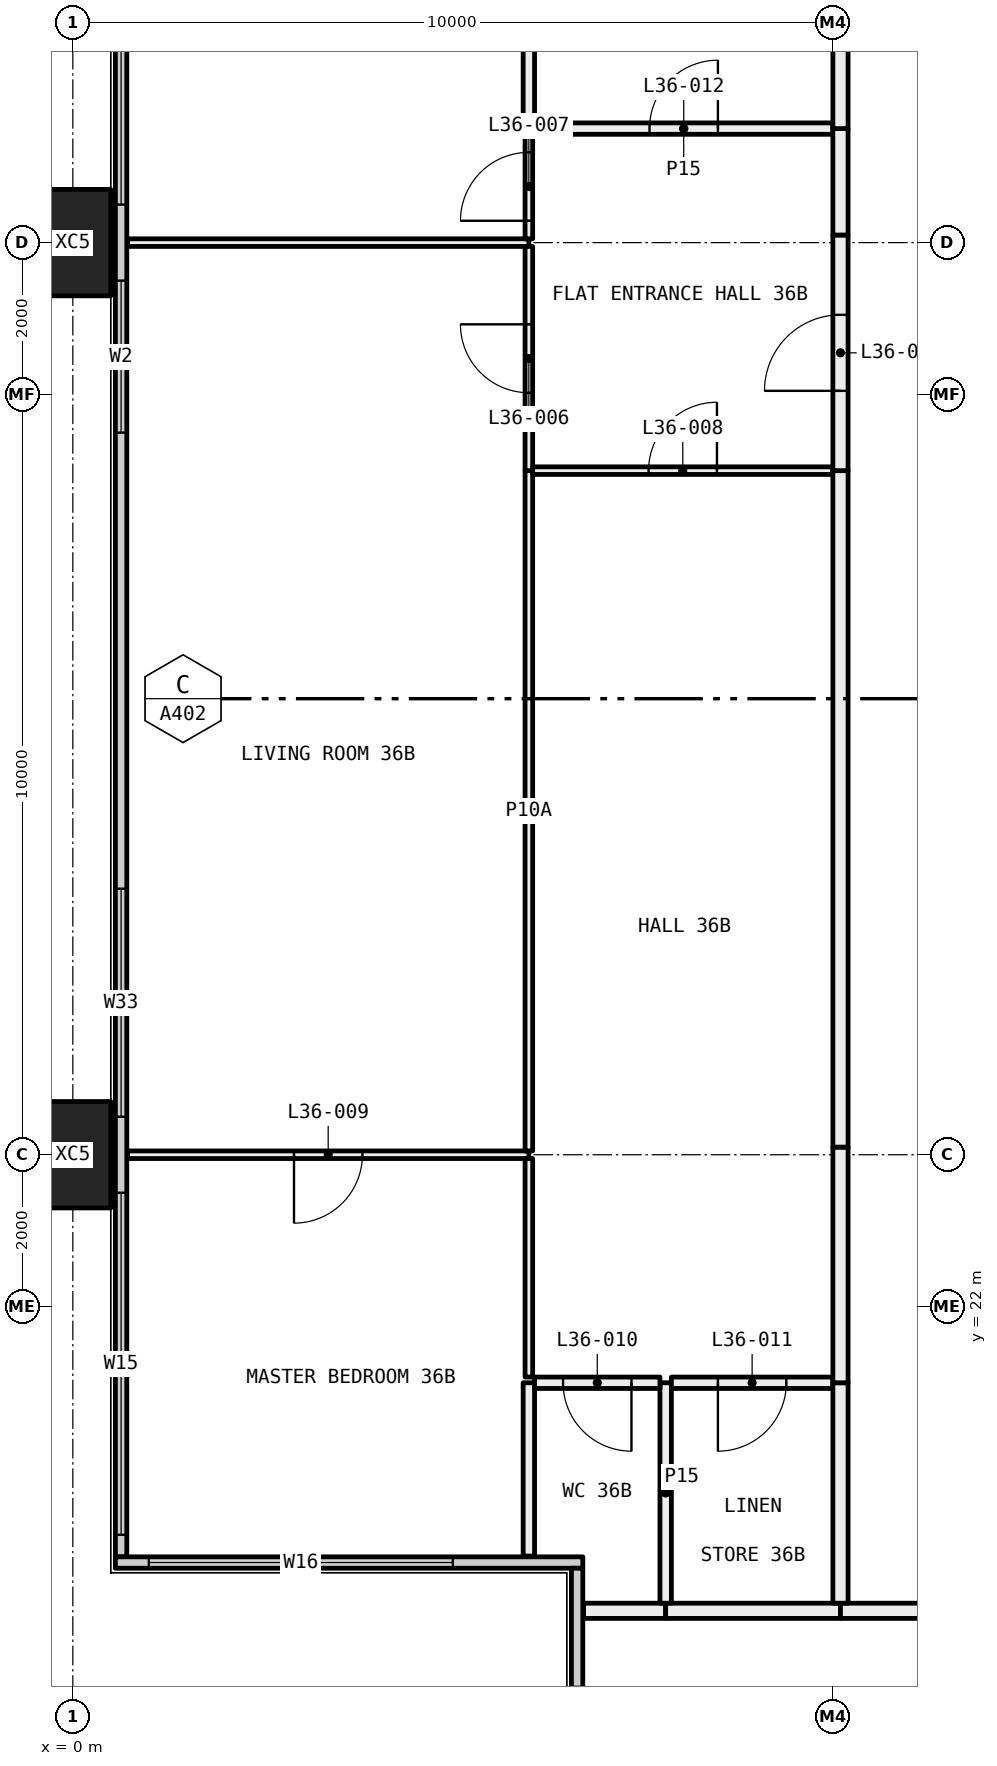
"""IFC4 building model, lengths in metres.
Left out: names, types, materials, properties, quantities, classifications, styles, units other than length and angle.
Written with IfcOpenShell. Run it as: python <this file> out.ifc"""

import sys

from ifc_helpers import new_model, si_unit, direction, frame, frame_2d, origin, origin_2d, place, context, subcontext, project, spatial, rectangle, hollow_rectangle, extrude, element, fill, save


model = new_model("IFC4")
c1 = context("Model", 3, precision=1e-05, world=origin(), true_north=direction((0.0, 1.0)))
c2 = subcontext(c1, "Body", "Model", "MODEL_VIEW")
j1 = project(units=[si_unit("LENGTHUNIT", "METRE"), si_unit("PLANEANGLEUNIT", "RADIAN")], contexts=[c1])
p1 = place(None, origin())
s1 = spatial("IfcSite", under=j1, at=p1, CompositionType="ELEMENT")
p2 = place(p1, origin())
s2 = spatial("IfcBuilding", under=s1, at=p2, CompositionType="ELEMENT")
p3 = place(p2, frame((0.0, 0.0, 138.0)))
s3 = spatial("IfcBuildingStorey", under=s2, at=p3, CompositionType="ELEMENT", Elevation=138.0)
for number, where, z_axis, x_axis in (
    (1, (0.0, 24.0, -0.4), (0.0, 0.0, 1.0), (0.0, 1.0, 0.0)),
    (2, (0.0, 36.0, -0.4), (0.0, 0.0, 1.0), (0.0, 1.0, 0.0)),
):
    element("IfcColumn", number, at=place(p3, frame(where, z_axis=z_axis, x_axis=x_axis)), inside=s3, PredefinedType="COLUMN", context=c2, shape_type="SweptSolid", body=[
        extrude(hollow_rectangle(XDim=1.4, YDim=1.0, WallThickness=0.055, at=origin_2d()), origin(), (0.0, 0.0, 1.0), 3.45),
    ])
p4 = place(p3, frame((0.635, 18.71, 0.0), z_axis=(0.0, 0.0, 1.0), x_axis=(0.0, 1.0, 0.0)))
e3 = element("IfcWall", 3, at=p4, inside=s3, PredefinedType="ELEMENTEDWALL", context=c2, shape_type="SweptSolid", body=[
    extrude(rectangle(XDim=22.58, YDim=0.15, at=frame_2d((11.29, 0.0))), origin(), (0.0, 0.0, 1.0), 3.05),
])
p5 = place(p4, frame((0.29, 0.0, 0.45)))
e4 = element("IfcOpeningElement", 4, at=p5, cuts=e3, PredefinedType="OPENING", context=c2, shape_type="SweptSolid", body=[
    extrude(rectangle(XDim=4.5, YDim=2.55, at=frame_2d((2.25, 1.275))), frame((0.0, 0.085, 0.0), z_axis=(0.0, -1.0, 0.0), x_axis=(1.0, 0.0, 0.0)), (0.0, 0.0, 1.0), 0.17),
])
p6 = place(p4, frame((5.79, 0.0, 0.45)))
e5 = element("IfcOpeningElement", 5, at=p6, cuts=e3, PredefinedType="OPENING", context=c2, shape_type="SweptSolid", body=[
    extrude(rectangle(XDim=3.0, YDim=2.55, at=frame_2d((1.5, 1.275))), frame((0.0, 0.085, 0.0), z_axis=(0.0, -1.0, 0.0), x_axis=(1.0, 0.0, 0.0)), (0.0, 0.0, 1.0), 0.17),
])
p7 = place(p4, frame((14.79, 0.0, 0.45)))
e6 = element("IfcOpeningElement", 6, at=p7, cuts=e3, PredefinedType="OPENING", context=c2, shape_type="SweptSolid", body=[
    extrude(rectangle(XDim=2.0, YDim=2.55, at=frame_2d((1.0, 1.275))), frame((0.0, 0.085, 0.0), z_axis=(0.0, -1.0, 0.0), x_axis=(1.0, 0.0, 0.0)), (0.0, 0.0, 1.0), 0.17),
])
p8 = place(p4, frame((17.79, 0.0, 0.45)))
e7 = element("IfcOpeningElement", 7, at=p8, cuts=e3, PredefinedType="OPENING", context=c2, shape_type="SweptSolid", body=[
    extrude(rectangle(XDim=4.5, YDim=2.55, at=frame_2d((2.25, 1.275))), frame((0.0, 0.085, 0.0), z_axis=(0.0, -1.0, 0.0), x_axis=(1.0, 0.0, 0.0)), (0.0, 0.0, 1.0), 0.17),
])
p9 = place(p3, frame((0.56, 18.635, 0.0), z_axis=(0.0, 0.0, 1.0), x_axis=(1.0, 0.0, 0.0)))
e8 = element("IfcWall", 8, at=p9, inside=s3, PredefinedType="ELEMENTEDWALL", context=c2, shape_type="SweptSolid", body=[
    extrude(rectangle(XDim=6.15, YDim=0.15, at=frame_2d((3.075, 0.0))), origin(), (0.0, 0.0, 1.0), 3.05),
])
p10 = place(p9, frame((0.44, 0.0, 0.45)))
e9 = element("IfcOpeningElement", 9, at=p10, cuts=e8, PredefinedType="OPENING", context=c2, shape_type="SweptSolid", body=[
    extrude(rectangle(XDim=4.0, YDim=2.55, at=frame_2d((2.0, 1.275))), frame((0.0, 0.085, 0.0), z_axis=(0.0, -1.0, 0.0), x_axis=(1.0, 0.0, 0.0)), (0.0, 0.0, 1.0), 0.17),
])
p11 = place(p3, frame((6.635, 12.71, 0.0), z_axis=(0.0, 0.0, 1.0), x_axis=(0.0, 1.0, 0.0)))
e10 = element("IfcWall", 10, at=p11, inside=s3, PredefinedType="ELEMENTEDWALL", context=c2, shape_type="SweptSolid", body=[
    extrude(rectangle(XDim=5.85, YDim=0.15, at=frame_2d((2.925, 0.0))), origin(), (0.0, 0.0, 1.0), 3.05),
])
p12 = place(p11, frame((0.29, 0.0, 0.45)))
e11 = element("IfcOpeningElement", 11, at=p12, cuts=e10, PredefinedType="OPENING", context=c2, shape_type="SweptSolid", body=[
    extrude(rectangle(XDim=4.0, YDim=2.55, at=frame_2d((2.0, 1.275))), frame((0.0, 0.085, 0.0), z_axis=(0.0, -1.0, 0.0), x_axis=(1.0, 0.0, 0.0)), (0.0, 0.0, 1.0), 0.17),
])
p13 = place(p3, frame((7.8, 18.0, 0.0), z_axis=(0.0, 0.0, 1.0), x_axis=(-1.0, 0.0, 0.0)))
e12 = element("IfcWall", 12, at=p13, inside=s3, PredefinedType="PARTITIONING", context=c2, shape_type="SweptSolid", body=[
    extrude(rectangle(XDim=1.08, YDim=0.2, at=frame_2d((0.54, 0.0))), origin(), (0.0, 0.0, 1.0), 3.05),
])
p14 = place(p3, frame((10.1, 18.0, 0.0), z_axis=(0.0, 0.0, 1.0), x_axis=(-1.0, 0.0, 0.0)))
e13 = element("IfcWall", 13, at=p14, inside=s3, PredefinedType="PARTITIONING", context=c2, shape_type="SweptSolid", body=[
    extrude(rectangle(XDim=2.3, YDim=0.2, at=frame_2d((1.15, 0.0))), origin(), (0.0, 0.0, 1.0), 3.05),
])
p15 = place(p3, frame((12.0, 18.0, 0.0), z_axis=(0.0, 0.0, 1.0), x_axis=(-1.0, 0.0, 0.0)))
e14 = element("IfcWall", 14, at=p15, inside=s3, PredefinedType="PARTITIONING", context=c2, shape_type="SweptSolid", body=[
    extrude(rectangle(XDim=1.9, YDim=0.2, at=frame_2d((0.95, 0.0))), origin(), (0.0, 0.0, 1.0), 3.05),
])
p16 = place(p3, frame((6.0, 24.0, 0.0), z_axis=(0.0, 0.0, 1.0), x_axis=(-1.0, 0.0, 0.0)))
e15 = element("IfcWall", 15, at=p16, inside=s3, PredefinedType="PARTITIONING", context=c2, shape_type="SweptSolid", body=[
    extrude(rectangle(XDim=5.28, YDim=0.1, at=frame_2d((2.64, 0.0))), origin(), (0.0, 0.0, 1.0), 2.45),
])
p17 = place(p16, frame((2.19, 0.0, 0.0)))
e16 = element("IfcOpeningElement", 16, at=p17, cuts=e15, PredefinedType="OPENING", context=c2, shape_type="SweptSolid", body=[
    extrude(rectangle(XDim=0.9, YDim=2.1, at=frame_2d((0.45, 1.05))), frame((0.0, 0.06, 0.0), z_axis=(0.0, -1.0, 0.0), x_axis=(1.0, 0.0, 0.0)), (0.0, 0.0, 1.0), 0.12),
])
p18 = place(p3, frame((6.0, 18.72, 0.0), z_axis=(0.0, 0.0, 1.0), x_axis=(0.0, 1.0, 0.0)))
e17 = element("IfcWall", 17, at=p18, inside=s3, PredefinedType="PARTITIONING", context=c2, shape_type="SweptSolid", body=[
    extrude(rectangle(XDim=2.28, YDim=0.15, at=frame_2d((1.14, 0.0))), origin(), (0.0, 0.0, 1.0), 3.05),
])
p19 = place(p3, frame((6.0, 21.075, 0.0), z_axis=(0.0, 0.0, 1.0), x_axis=(0.0, 1.0, 0.0)))
e18 = element("IfcWall", 18, at=p19, inside=s3, PredefinedType="PARTITIONING", context=c2, shape_type="SweptSolid", body=[
    extrude(rectangle(XDim=2.875, YDim=0.1, at=frame_2d((1.438, 0.0))), origin(), (0.0, 0.0, 1.0), 2.45),
])
p20 = place(p3, frame((6.0, 36.0, 0.0), z_axis=(0.0, 0.0, 1.0), x_axis=(-1.0, 0.0, 0.0)))
e19 = element("IfcWall", 19, at=p20, inside=s3, PredefinedType="PARTITIONING", context=c2, shape_type="SweptSolid", body=[
    extrude(rectangle(XDim=5.28, YDim=0.1, at=frame_2d((2.64, 0.0))), origin(), (0.0, 0.0, 1.0), 2.45),
])
p21 = place(p3, frame((6.0, 24.05, 0.0), z_axis=(0.0, 0.0, 1.0), x_axis=(0.0, 1.0, 0.0)))
e20 = element("IfcWall", 20, at=p21, inside=s3, PredefinedType="PARTITIONING", context=c2, shape_type="SweptSolid", body=[
    extrude(rectangle(XDim=8.95, YDim=0.1, at=frame_2d((4.475, 0.0))), origin(), (0.0, 0.0, 1.0), 2.45),
])
p22 = place(p3, frame((6.0, 33.0, 0.0), z_axis=(0.0, 0.0, 1.0), x_axis=(0.0, 1.0, 0.0)))
e21 = element("IfcWall", 21, at=p22, inside=s3, PredefinedType="PARTITIONING", context=c2, shape_type="SweptSolid", body=[
    extrude(rectangle(XDim=2.95, YDim=0.1, at=frame_2d((1.475, 0.0))), origin(), (0.0, 0.0, 1.0), 2.45),
])
p23 = place(p22, frame((1.025, 0.0, 0.0)))
e22 = element("IfcOpeningElement", 22, at=p23, cuts=e21, PredefinedType="OPENING", context=c2, shape_type="SweptSolid", body=[
    extrude(rectangle(XDim=0.9, YDim=2.1, at=frame_2d((0.45, 1.05))), frame((0.0, 0.06, 0.0), z_axis=(0.0, -1.0, 0.0), x_axis=(1.0, 0.0, 0.0)), (0.0, 0.0, 1.0), 0.12),
])
p24 = place(p3, frame((6.0, 36.05, 0.0), z_axis=(0.0, 0.0, 1.0), x_axis=(0.0, 1.0, 0.0)))
e23 = element("IfcWall", 23, at=p24, inside=s3, PredefinedType="PARTITIONING", context=c2, shape_type="SweptSolid", body=[
    extrude(rectangle(XDim=1.375, YDim=0.1, at=frame_2d((0.688, 0.0))), origin(), (0.0, 0.0, 1.0), 2.45),
])
p25 = place(p24, frame((0.238, 0.0, 0.0)))
e24 = element("IfcOpeningElement", 24, at=p25, cuts=e23, PredefinedType="OPENING", context=c2, shape_type="SweptSolid", body=[
    extrude(rectangle(XDim=0.9, YDim=2.1, at=frame_2d((0.45, 1.05))), frame((0.0, 0.06, 0.0), z_axis=(0.0, -1.0, 0.0), x_axis=(1.0, 0.0, 0.0)), (0.0, 0.0, 1.0), 0.12),
])
p26 = place(p3, frame((6.0, 37.5, 0.0), z_axis=(0.0, 0.0, 1.0), x_axis=(0.0, 1.0, 0.0)))
e25 = element("IfcWall", 25, at=p26, inside=s3, PredefinedType="PARTITIONING", context=c2, shape_type="SweptSolid", body=[
    extrude(rectangle(XDim=3.78, YDim=0.15, at=frame_2d((1.89, 0.0))), origin(), (0.0, 0.0, 1.0), 3.05),
])
p27 = place(p3, frame((7.8, 18.1, 0.0), z_axis=(0.0, 0.0, 1.0), x_axis=(0.0, 1.0, 0.0)))
e26 = element("IfcWall", 26, at=p27, inside=s3, PredefinedType="PARTITIONING", context=c2, shape_type="SweptSolid", body=[
    extrude(rectangle(XDim=2.9, YDim=0.15, at=frame_2d((1.45, 0.0))), origin(), (0.0, 0.0, 1.0), 3.05),
])
p28 = place(p3, frame((7.725, 21.0, 0.0), z_axis=(0.0, 0.0, 1.0), x_axis=(-1.0, 0.0, 0.0)))
e27 = element("IfcWall", 27, at=p28, inside=s3, PredefinedType="PARTITIONING", context=c2, shape_type="SweptSolid", body=[
    extrude(rectangle(XDim=1.65, YDim=0.15, at=frame_2d((0.825, 0.0))), origin(), (0.0, 0.0, 1.0), 3.05),
])
p29 = place(p28, frame((0.375, 0.0, 0.0)))
e28 = element("IfcOpeningElement", 28, at=p29, cuts=e27, PredefinedType="OPENING", context=c2, shape_type="SweptSolid", body=[
    extrude(rectangle(XDim=0.9, YDim=2.1, at=frame_2d((0.45, 1.05))), frame((0.0, 0.085, 0.0), z_axis=(0.0, -1.0, 0.0), x_axis=(1.0, 0.0, 0.0)), (0.0, 0.0, 1.0), 0.17),
])
p30 = place(p3, frame((10.0, 21.0, 0.0), z_axis=(0.0, 0.0, 1.0), x_axis=(-1.0, 0.0, 0.0)))
e29 = element("IfcWall", 29, at=p30, inside=s3, PredefinedType="PARTITIONING", context=c2, shape_type="SweptSolid", body=[
    extrude(rectangle(XDim=2.125, YDim=0.15, at=frame_2d((1.062, 0.0))), origin(), (0.0, 0.0, 1.0), 3.05),
])
p31 = place(p30, frame((0.613, 0.0, 0.0)))
e30 = element("IfcOpeningElement", 30, at=p31, cuts=e29, PredefinedType="OPENING", context=c2, shape_type="SweptSolid", body=[
    extrude(rectangle(XDim=0.9, YDim=2.1, at=frame_2d((0.45, 1.05))), frame((0.0, 0.085, 0.0), z_axis=(0.0, -1.0, 0.0), x_axis=(1.0, 0.0, 0.0)), (0.0, 0.0, 1.0), 0.17),
])
p32 = place(p3, frame((10.1, 18.1, 0.0), z_axis=(0.0, 0.0, 1.0), x_axis=(0.0, 1.0, 0.0)))
e31 = element("IfcWall", 31, at=p32, inside=s3, PredefinedType="PARTITIONING", context=c2, shape_type="SweptSolid", body=[
    extrude(rectangle(XDim=2.9, YDim=0.2, at=frame_2d((1.45, 0.0))), origin(), (0.0, 0.0, 1.0), 3.05),
])
p33 = place(p3, frame((10.0, 33.0, 0.0), z_axis=(0.0, 0.0, 1.0), x_axis=(-1.0, 0.0, 0.0)))
e32 = element("IfcWall", 32, at=p33, inside=s3, PredefinedType="PARTITIONING", context=c2, shape_type="SweptSolid", body=[
    extrude(rectangle(XDim=3.95, YDim=0.1, at=frame_2d((1.975, 0.0))), origin(), (0.0, 0.0, 1.0), 3.05),
])
p34 = place(p33, frame((1.525, 0.0, 0.0)))
e33 = element("IfcOpeningElement", 33, at=p34, cuts=e32, PredefinedType="OPENING", context=c2, shape_type="SweptSolid", body=[
    extrude(rectangle(XDim=0.9, YDim=2.1, at=frame_2d((0.45, 1.05))), frame((0.0, 0.06, 0.0), z_axis=(0.0, -1.0, 0.0), x_axis=(1.0, 0.0, 0.0)), (0.0, 0.0, 1.0), 0.12),
])
p35 = place(p3, frame((10.1, 21.0, 0.0), z_axis=(0.0, 0.0, 1.0), x_axis=(0.0, 1.0, 0.0)))
e34 = element("IfcWall", 34, at=p35, inside=s3, PredefinedType="PARTITIONING", context=c2, shape_type="SweptSolid", body=[
    extrude(rectangle(XDim=3.1, YDim=0.2, at=frame_2d((1.55, 0.0))), origin(), (0.0, 0.0, 1.0), 2.45),
])
p36 = place(p3, frame((10.1, 24.1, 0.0), z_axis=(0.0, 0.0, 1.0), x_axis=(0.0, 1.0, 0.0)))
e35 = element("IfcWall", 35, at=p36, inside=s3, PredefinedType="PARTITIONING", context=c2, shape_type="SweptSolid", body=[
    extrude(rectangle(XDim=8.9, YDim=0.2, at=frame_2d((4.45, 0.0))), origin(), (0.0, 0.0, 1.0), 3.05),
])
p37 = place(p3, frame((10.0, 37.5, 0.0), z_axis=(0.0, 0.0, 1.0), x_axis=(-1.0, 0.0, 0.0)))
e36 = element("IfcWall", 36, at=p37, inside=s3, PredefinedType="PARTITIONING", context=c2, shape_type="SweptSolid", body=[
    extrude(rectangle(XDim=3.925, YDim=0.15, at=frame_2d((1.962, 0.0))), origin(), (0.0, 0.0, 1.0), 3.05),
])
p38 = place(p37, frame((1.512, 0.0, 0.0)))
e37 = element("IfcOpeningElement", 37, at=p38, cuts=e36, PredefinedType="OPENING", context=c2, shape_type="SweptSolid", body=[
    extrude(rectangle(XDim=0.9, YDim=2.1, at=frame_2d((0.45, 1.05))), frame((0.0, 0.085, 0.0), z_axis=(0.0, -1.0, 0.0), x_axis=(1.0, 0.0, 0.0)), (0.0, 0.0, 1.0), 0.17),
])
p39 = place(p3, frame((10.1, 33.0, 0.0), z_axis=(0.0, 0.0, 1.0), x_axis=(0.0, 1.0, 0.0)))
e38 = element("IfcWall", 38, at=p39, inside=s3, PredefinedType="PARTITIONING", context=c2, shape_type="SweptSolid", body=[
    extrude(rectangle(XDim=3.1, YDim=0.2, at=frame_2d((1.55, 0.0))), origin(), (0.0, 0.0, 1.0), 2.45),
])
p40 = place(p39, frame((1.05, 0.0, 0.0)))
e39 = element("IfcOpeningElement", 39, at=p40, cuts=e38, PredefinedType="OPENING", context=c2, shape_type="SweptSolid", body=[
    extrude(rectangle(XDim=1.0, YDim=2.1, at=frame_2d((0.5, 1.05))), frame((0.0, 0.11, 0.0), z_axis=(0.0, -1.0, 0.0), x_axis=(1.0, 0.0, 0.0)), (0.0, 0.0, 1.0), 0.22),
])
p41 = place(p3, frame((10.1, 36.1, 0.0), z_axis=(0.0, 0.0, 1.0), x_axis=(0.0, 1.0, 0.0)))
e40 = element("IfcWall", 40, at=p41, inside=s3, PredefinedType="PARTITIONING", context=c2, shape_type="SweptSolid", body=[
    extrude(rectangle(XDim=1.4, YDim=0.2, at=frame_2d((0.7, 0.0))), origin(), (0.0, 0.0, 1.0), 3.05),
])
p42 = place(p3, frame((10.1, 37.5, 0.0), z_axis=(0.0, 0.0, 1.0), x_axis=(0.0, 1.0, 0.0)))
e41 = element("IfcWall", 41, at=p42, inside=s3, PredefinedType="PARTITIONING", context=c2, shape_type="SweptSolid", body=[
    extrude(rectangle(XDim=4.4, YDim=0.2, at=frame_2d((2.2, 0.0))), origin(), (0.0, 0.0, 1.0), 3.05),
])
p43 = place(p5, origin())
e42 = element("IfcWindow", 42, at=p43, inside=s3, PartitioningType="SINGLE_PANEL", PredefinedType="WINDOW", context=c2, shape_type="SweptSolid", body=[
    extrude(rectangle(XDim=4.5, YDim=2.55, at=frame_2d((2.25, 1.275))), frame((0.0, 0.03, 0.0), z_axis=(0.0, -1.0, 0.0), x_axis=(1.0, 0.0, 0.0)), (0.0, 0.0, 1.0), 0.06),
])
fill(e4, e42)
p44 = place(p6, origin())
e43 = element("IfcWindow", 43, at=p44, inside=s3, PartitioningType="SINGLE_PANEL", PredefinedType="WINDOW", context=c2, shape_type="SweptSolid", body=[
    extrude(rectangle(XDim=3.0, YDim=2.55, at=frame_2d((1.5, 1.275))), frame((0.0, 0.03, 0.0), z_axis=(0.0, -1.0, 0.0), x_axis=(1.0, 0.0, 0.0)), (0.0, 0.0, 1.0), 0.06),
])
fill(e5, e43)
p45 = place(p7, origin())
e44 = element("IfcWindow", 44, at=p45, inside=s3, PartitioningType="SINGLE_PANEL", PredefinedType="WINDOW", context=c2, shape_type="SweptSolid", body=[
    extrude(rectangle(XDim=2.0, YDim=2.55, at=frame_2d((1.0, 1.275))), frame((0.0, 0.03, 0.0), z_axis=(0.0, -1.0, 0.0), x_axis=(1.0, 0.0, 0.0)), (0.0, 0.0, 1.0), 0.06),
])
fill(e6, e44)
p46 = place(p8, origin())
e45 = element("IfcWindow", 45, at=p46, inside=s3, PartitioningType="SINGLE_PANEL", PredefinedType="WINDOW", context=c2, shape_type="SweptSolid", body=[
    extrude(rectangle(XDim=4.5, YDim=2.55, at=frame_2d((2.25, 1.275))), frame((0.0, 0.03, 0.0), z_axis=(0.0, -1.0, 0.0), x_axis=(1.0, 0.0, 0.0)), (0.0, 0.0, 1.0), 0.06),
])
fill(e7, e45)
p47 = place(p10, origin())
e46 = element("IfcWindow", 46, at=p47, inside=s3, PartitioningType="SINGLE_PANEL", PredefinedType="WINDOW", context=c2, shape_type="SweptSolid", body=[
    extrude(rectangle(XDim=4.0, YDim=2.55, at=frame_2d((2.0, 1.275))), frame((0.0, 0.03, 0.0), z_axis=(0.0, -1.0, 0.0), x_axis=(1.0, 0.0, 0.0)), (0.0, 0.0, 1.0), 0.06),
])
fill(e9, e46)
p48 = place(p40, origin())
e47 = element("IfcDoor", 47, at=p48, inside=s3, OperationType="SINGLE_SWING_RIGHT", PredefinedType="DOOR", context=c2, shape_type="SweptSolid", body=[
    extrude(rectangle(XDim=1.0, YDim=2.1, at=frame_2d((0.5, 1.05))), frame((0.0, 0.025, 0.0), z_axis=(0.0, -1.0, 0.0), x_axis=(1.0, 0.0, 0.0)), (0.0, 0.0, 1.0), 0.05),
])
fill(e39, e47)
p49 = place(p23, origin())
e48 = element("IfcDoor", 48, at=p49, inside=s3, OperationType="SINGLE_SWING_LEFT", PredefinedType="DOOR", context=c2, shape_type="SweptSolid", body=[
    extrude(rectangle(XDim=0.9, YDim=2.1, at=frame_2d((0.45, 1.05))), frame((0.0, 0.025, 0.0), z_axis=(0.0, -1.0, 0.0), x_axis=(1.0, 0.0, 0.0)), (0.0, 0.0, 1.0), 0.05),
])
fill(e22, e48)
p50 = place(p25, origin())
e49 = element("IfcDoor", 49, at=p50, inside=s3, OperationType="SINGLE_SWING_RIGHT", PredefinedType="DOOR", context=c2, shape_type="SweptSolid", body=[
    extrude(rectangle(XDim=0.9, YDim=2.1, at=frame_2d((0.45, 1.05))), frame((0.0, 0.025, 0.0), z_axis=(0.0, -1.0, 0.0), x_axis=(1.0, 0.0, 0.0)), (0.0, 0.0, 1.0), 0.05),
])
fill(e24, e49)
p51 = place(p34, frame((0.9, 0.0, 0.0), x_axis=(-1.0, 0.0, 0.0)))
e50 = element("IfcDoor", 50, at=p51, inside=s3, OperationType="SINGLE_SWING_LEFT", PredefinedType="DOOR", context=c2, shape_type="SweptSolid", body=[
    extrude(rectangle(XDim=0.9, YDim=2.1, at=frame_2d((0.45, 1.05))), frame((0.0, 0.025, 0.0), z_axis=(0.0, -1.0, 0.0), x_axis=(1.0, 0.0, 0.0)), (0.0, 0.0, 1.0), 0.05),
])
fill(e33, e50)
p52 = place(p17, origin())
e51 = element("IfcDoor", 51, at=p52, inside=s3, OperationType="SINGLE_SWING_LEFT", PredefinedType="DOOR", context=c2, shape_type="SweptSolid", body=[
    extrude(rectangle(XDim=0.9, YDim=2.1, at=frame_2d((0.45, 1.05))), frame((0.0, 0.025, 0.0), z_axis=(0.0, -1.0, 0.0), x_axis=(1.0, 0.0, 0.0)), (0.0, 0.0, 1.0), 0.05),
])
fill(e16, e51)
p53 = place(p29, origin())
e52 = element("IfcDoor", 52, at=p53, inside=s3, OperationType="SINGLE_SWING_RIGHT", PredefinedType="DOOR", context=c2, shape_type="SweptSolid", body=[
    extrude(rectangle(XDim=0.9, YDim=2.1, at=frame_2d((0.45, 1.05))), frame((0.0, 0.025, 0.0), z_axis=(0.0, -1.0, 0.0), x_axis=(1.0, 0.0, 0.0)), (0.0, 0.0, 1.0), 0.05),
])
fill(e28, e52)
p54 = place(p31, origin())
e53 = element("IfcDoor", 53, at=p54, inside=s3, OperationType="SINGLE_SWING_LEFT", PredefinedType="DOOR", context=c2, shape_type="SweptSolid", body=[
    extrude(rectangle(XDim=0.9, YDim=2.1, at=frame_2d((0.45, 1.05))), frame((0.0, 0.025, 0.0), z_axis=(0.0, -1.0, 0.0), x_axis=(1.0, 0.0, 0.0)), (0.0, 0.0, 1.0), 0.05),
])
fill(e30, e53)
p55 = place(p38, frame((0.9, 0.0, 0.0), x_axis=(-1.0, 0.0, 0.0)))
e54 = element("IfcDoor", 54, at=p55, inside=s3, OperationType="SINGLE_SWING_LEFT", PredefinedType="DOOR", context=c2, shape_type="SweptSolid", body=[
    extrude(rectangle(XDim=0.9, YDim=2.1, at=frame_2d((0.45, 1.05))), frame((0.0, 0.025, 0.0), z_axis=(0.0, -1.0, 0.0), x_axis=(1.0, 0.0, 0.0)), (0.0, 0.0, 1.0), 0.05),
])
fill(e37, e54)
save(model, sys.argv[1])
